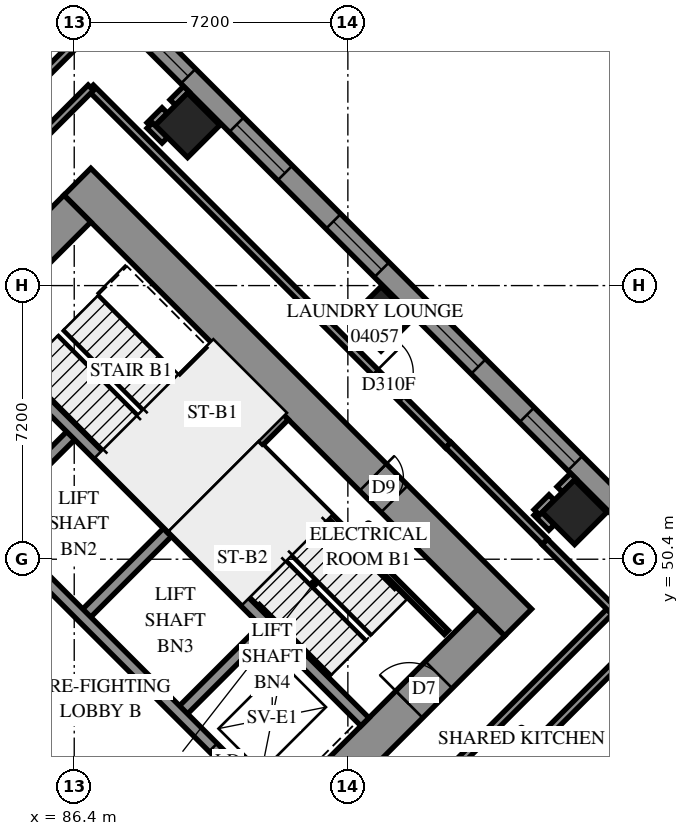
"""IFC4 building model, lengths in metres.
Left out: names, types, materials, properties, quantities, classifications, styles, units other than length and angle.
Written with IfcOpenShell. Run it as: python <this file> out.ifc"""

import sys

from ifc_helpers import new_model, si_unit, direction, frame, frame_2d, origin, origin_2d, place, context, subcontext, project, spatial, polyline, rectangle, outline, extrude, element, fill, save


model = new_model("IFC4")
c1 = context("Model", 3, precision=1e-05, world=origin(), true_north=direction((0.0, 1.0)))
c2 = subcontext(c1, "Body", "Model", "MODEL_VIEW")
j1 = project(units=[si_unit("LENGTHUNIT", "METRE"), si_unit("PLANEANGLEUNIT", "RADIAN")], contexts=[c1])
p1 = place(None, origin())
s1 = spatial("IfcSite", under=j1, at=p1, CompositionType="ELEMENT")
p2 = place(p1, origin())
s2 = spatial("IfcBuilding", under=s1, at=p2, CompositionType="ELEMENT")
p3 = place(p2, frame((0.0, 0.0, 18.6)))
s3 = spatial("IfcBuildingStorey", under=s2, at=p3, CompositionType="ELEMENT", Elevation=18.6)
for number, where, z_axis, x_axis in (
    (1, (89.382, 61.818, 0.0), (0.0, 0.0, 1.0), (0.707, -0.707, 0.0)),
    (2, (94.474, 56.727, 0.0), (0.0, 0.0, 1.0), (0.707, -0.707, 0.0)),
    (3, (99.565, 51.635, 0.0), (0.0, 0.0, 1.0), (0.707, -0.707, 0.0)),
):
    element("IfcColumn", number, at=place(p3, frame(where, z_axis=z_axis, x_axis=x_axis)), inside=s3, PredefinedType="COLUMN", context=c2, shape_type="SweptSolid", body=[
        extrude(rectangle(XDim=1.2, YDim=1.2, at=origin_2d()), origin(), (0.0, 0.0, 1.0), 3.8),
    ])
p4 = place(p3, frame((75.594, 49.443, -0.4), z_axis=(0.0, 0.0, 1.0), x_axis=(0.7071037324, -0.70710983, 0.0)))
e4 = element("IfcWall", 4, at=p4, inside=s3, PredefinedType="SHEAR", context=c2, shape_type="SweptSolid", body=[
    extrude(rectangle(XDim=16.4, YDim=1.0, at=frame_2d((8.2, 0.0))), origin(), (0.0, 0.0, 1.0), 3.5),
])
p5 = place(p3, frame((86.483, 60.333, -0.4), z_axis=(0.0, 0.0, 1.0), x_axis=(0.70710983, -0.7071037324, 0.0)))
e5 = element("IfcWall", 5, at=p5, inside=s3, PredefinedType="SHEAR", context=c2, shape_type="SweptSolid", body=[
    extrude(rectangle(XDim=16.4, YDim=1.0, at=frame_2d((8.2, 0.0))), origin(), (0.0, 0.0, 1.0), 3.5),
])
p6 = place(p5, frame((11.0, 0.0, 0.4)))
e6 = element("IfcOpeningElement", 6, at=p6, cuts=e5, PredefinedType="OPENING", context=c2, shape_type="SweptSolid", body=[
    extrude(rectangle(XDim=0.8, YDim=2.1, at=frame_2d((0.4, 1.05))), frame((0.0, 0.51, 0.0), z_axis=(0.0, -1.0, 0.0), x_axis=(1.0, 0.0, 0.0)), (0.0, 0.0, 1.0), 1.02),
])
p7 = place(p3, frame((76.301, 49.443, -0.4), z_axis=(0.0, 0.0, 1.0), x_axis=(0.7071067812, 0.7071067812, 0.0)))
e7 = element("IfcWall", 7, at=p7, inside=s3, PredefinedType="SHEAR", context=c2, shape_type="SweptSolid", body=[
    extrude(rectangle(XDim=14.4, YDim=1.0, at=frame_2d((7.2, 0.0))), origin(), (0.0, 0.0, 1.0), 3.5),
])
p8 = place(p7, frame((4.55, 0.0, 0.4)))
e8 = element("IfcOpeningElement", 8, at=p8, cuts=e7, PredefinedType="OPENING", context=c2, shape_type="SweptSolid", body=[
    extrude(rectangle(XDim=1.1, YDim=2.1, at=frame_2d((0.55, 1.05))), frame((0.0, 0.51, 0.0), z_axis=(0.0, -1.0, 0.0), x_axis=(1.0, 0.0, 0.0)), (0.0, 0.0, 1.0), 1.02),
])
p9 = place(p7, frame((11.35, 0.0, 0.4)))
e9 = element("IfcOpeningElement", 9, at=p9, cuts=e7, PredefinedType="OPENING", context=c2, shape_type="SweptSolid", body=[
    extrude(rectangle(XDim=1.1, YDim=2.1, at=frame_2d((0.55, 1.05))), frame((0.0, 0.51, 0.0), z_axis=(0.0, -1.0, 0.0), x_axis=(1.0, 0.0, 0.0)), (0.0, 0.0, 1.0), 1.02),
])
p10 = place(p3, frame((87.19, 38.554, -0.4), z_axis=(0.0, 0.0, 1.0), x_axis=(0.707103309, 0.7071102534, 0.0)))
e10 = element("IfcWall", 10, at=p10, inside=s3, PredefinedType="SHEAR", context=c2, shape_type="SweptSolid", body=[
    extrude(rectangle(XDim=14.4, YDim=1.0, at=frame_2d((7.2, 0.0))), origin(), (0.0, 0.0, 1.0), 3.5),
])
p11 = place(p10, frame((4.55, 0.0, 0.4)))
e11 = element("IfcOpeningElement", 11, at=p11, cuts=e10, PredefinedType="OPENING", context=c2, shape_type="SweptSolid", body=[
    extrude(rectangle(XDim=1.1, YDim=2.1, at=frame_2d((0.55, 1.05))), frame((0.0, 0.51, 0.0), z_axis=(0.0, -1.0, 0.0), x_axis=(1.0, 0.0, 0.0)), (0.0, 0.0, 1.0), 1.02),
])
p12 = place(p10, frame((11.35, 0.0, 0.4)))
e12 = element("IfcOpeningElement", 12, at=p12, cuts=e10, PredefinedType="OPENING", context=c2, shape_type="SweptSolid", body=[
    extrude(rectangle(XDim=1.1, YDim=2.1, at=frame_2d((0.55, 1.05))), frame((0.0, 0.51, 0.0), z_axis=(0.0, -1.0, 0.0), x_axis=(1.0, 0.0, 0.0)), (0.0, 0.0, 1.0), 1.02),
])
p13 = place(p3, frame((84.079, 51.423, 0.0), z_axis=(0.0, 0.0, 1.0), x_axis=(0.7071219326, 0.7070916295, 0.0)))
e13 = element("IfcWall", 13, at=p13, inside=s3, PredefinedType="SOLIDWALL", context=c2, shape_type="SweptSolid", body=[
    extrude(rectangle(XDim=3.3, YDim=0.3, at=frame_2d((1.65, 0.0))), origin(), (0.0, 0.0, 1.0), 3.8),
])
for number, where, z_axis, x_axis in (
    (14, (86.625, 48.878, 0.0), (0.0, 0.0, 1.0), (0.707, 0.707, 0.0)),
    (15, (89.17, 46.332, 0.0), (0.0, 0.0, 1.0), (0.707, 0.707, 0.0)),
):
    element("IfcWall", number, at=place(p3, frame(where, z_axis=z_axis, x_axis=x_axis)), inside=s3, PredefinedType="SOLIDWALL", context=c2, shape_type="SweptSolid", body=[
        extrude(rectangle(XDim=3.3, YDim=0.3, at=frame_2d((1.65, 0.0))), origin(), (0.0, 0.0, 1.0), 3.8),
    ])
p14 = place(p3, frame((78.988, 51.423, 0.0), z_axis=(0.0, 0.0, 1.0), x_axis=(0.7071067812, -0.7071067812, 0.0)))
e16 = element("IfcWall", 16, at=p14, inside=s3, PredefinedType="SOLIDWALL", context=c2, shape_type="SweptSolid", body=[
    extrude(rectangle(XDim=14.4, YDim=0.3, at=frame_2d((7.2, 0.0))), origin(), (0.0, 0.0, 1.0), 3.8),
])
p15 = place(p14, frame((1.25, 0.0, 0.0)))
e17 = element("IfcOpeningElement", 17, at=p15, cuts=e16, PredefinedType="OPENING", context=c2, shape_type="SweptSolid", body=[
    extrude(rectangle(XDim=1.1, YDim=2.1, at=frame_2d((0.55, 1.05))), frame((0.0, 0.16, 0.0), z_axis=(0.0, -1.0, 0.0), x_axis=(1.0, 0.0, 0.0)), (0.0, 0.0, 1.0), 0.32),
])
p16 = place(p14, frame((4.85, 0.0, 0.0)))
e18 = element("IfcOpeningElement", 18, at=p16, cuts=e16, PredefinedType="OPENING", context=c2, shape_type="SweptSolid", body=[
    extrude(rectangle(XDim=1.1, YDim=2.1, at=frame_2d((0.55, 1.05))), frame((0.0, 0.16, 0.0), z_axis=(0.0, -1.0, 0.0), x_axis=(1.0, 0.0, 0.0)), (0.0, 0.0, 1.0), 0.32),
])
p17 = place(p14, frame((8.45, 0.0, 0.0)))
e19 = element("IfcOpeningElement", 19, at=p17, cuts=e16, PredefinedType="OPENING", context=c2, shape_type="SweptSolid", body=[
    extrude(rectangle(XDim=1.1, YDim=2.1, at=frame_2d((0.55, 1.05))), frame((0.0, 0.16, 0.0), z_axis=(0.0, -1.0, 0.0), x_axis=(1.0, 0.0, 0.0)), (0.0, 0.0, 1.0), 0.32),
])
p18 = place(p14, frame((12.05, 0.0, 0.0)))
e20 = element("IfcOpeningElement", 20, at=p18, cuts=e16, PredefinedType="OPENING", context=c2, shape_type="SweptSolid", body=[
    extrude(rectangle(XDim=1.1, YDim=2.1, at=frame_2d((0.55, 1.05))), frame((0.0, 0.16, 0.0), z_axis=(0.0, -1.0, 0.0), x_axis=(1.0, 0.0, 0.0)), (0.0, 0.0, 1.0), 0.32),
])
p19 = place(p3, frame((81.534, 53.969, 0.0), z_axis=(0.0, 0.0, 1.0), x_axis=(0.707103309, -0.7071102534, 0.0)))
e21 = element("IfcWall", 21, at=p19, inside=s3, PredefinedType="SOLIDWALL", context=c2, shape_type="SweptSolid", body=[
    extrude(rectangle(XDim=14.4, YDim=0.3, at=frame_2d((7.2, 0.0))), origin(), (0.0, 0.0, 1.0), 3.8),
])
p20 = place(p19, frame((12.05, 0.0, 0.0)))
e22 = element("IfcOpeningElement", 22, at=p20, cuts=e21, PredefinedType="OPENING", context=c2, shape_type="SweptSolid", body=[
    extrude(rectangle(XDim=1.1, YDim=2.1, at=frame_2d((0.55, 1.05))), frame((0.0, 0.16, 0.0), z_axis=(0.0, -1.0, 0.0), x_axis=(1.0, 0.0, 0.0)), (0.0, 0.0, 1.0), 0.32),
])
for number, where, z_axis, x_axis in (
    (23, (83.867, 56.302, 0.0), (0.0, 0.0, 1.0), (0.707, -0.707, 0.0)),
    (24, (88.958, 51.211, 0.0), (0.0, 0.0, 1.0), (0.707, -0.707, 0.0)),
):
    element("IfcWall", number, at=place(p3, frame(where, z_axis=z_axis, x_axis=x_axis)), inside=s3, PredefinedType="SOLIDWALL", context=c2, shape_type="SweptSolid", body=[
        extrude(rectangle(XDim=7.2, YDim=0.3, at=frame_2d((3.6, 0.0))), origin(), (0.0, 0.0, 1.0), 3.8),
    ])
p21 = place(p3, frame((88.958, 51.211, 0.0), z_axis=(0.0, 0.0, 1.0), x_axis=(0.7071067812, 0.7071067812, 0.0)))
e25 = element("IfcWall", 25, at=p21, inside=s3, PredefinedType="SOLIDWALL", context=c2, shape_type="SweptSolid", body=[
    extrude(rectangle(XDim=4.2, YDim=0.3, at=frame_2d((2.1, 0.0))), origin(), (0.0, 0.0, 1.0), 3.8),
])
p22 = place(p3, frame((117.843, 34.665, 0.0), z_axis=(0.0, 0.0, 1.0), x_axis=(-0.7071067812, 0.7071067812, 0.0)))
e26 = element("IfcWall", 26, at=p22, inside=s3, PredefinedType="SOLIDWALL", context=c2, shape_type="SweptSolid", body=[
    extrude(outline(polyline([(-0.275, -0.275), (54.222, -0.275), (53.994, 0.275), (0.275, 0.275), (-0.275, -0.275)])), origin(), (0.0, 0.0, 1.0), 3.8),
])
p23 = place(p22, frame((0.8, 0.0, 0.7)))
e27 = element("IfcOpeningElement", 27, at=p23, cuts=e26, PredefinedType="OPENING", context=c2, shape_type="SweptSolid", body=[
    extrude(rectangle(XDim=1.8, YDim=2.4, at=frame_2d((0.9, 1.2))), frame((0.0, 0.285, 0.0), z_axis=(0.0, -1.0, 0.0), x_axis=(1.0, 0.0, 0.0)), (0.0, 0.0, 1.0), 0.57),
])
p24 = place(p22, frame((4.225, 0.0, 0.7)))
e28 = element("IfcOpeningElement", 28, at=p24, cuts=e26, PredefinedType="OPENING", context=c2, shape_type="SweptSolid", body=[
    extrude(rectangle(XDim=1.8, YDim=2.4, at=frame_2d((0.9, 1.2))), frame((0.0, 0.285, 0.0), z_axis=(0.0, -1.0, 0.0), x_axis=(1.0, 0.0, 0.0)), (0.0, 0.0, 1.0), 0.57),
])
p25 = place(p22, frame((7.825, 0.0, 0.7)))
e29 = element("IfcOpeningElement", 29, at=p25, cuts=e26, PredefinedType="OPENING", context=c2, shape_type="SweptSolid", body=[
    extrude(rectangle(XDim=1.8, YDim=2.4, at=frame_2d((0.9, 1.2))), frame((0.0, 0.285, 0.0), z_axis=(0.0, -1.0, 0.0), x_axis=(1.0, 0.0, 0.0)), (0.0, 0.0, 1.0), 0.57),
])
p26 = place(p22, frame((11.425, 0.0, 0.7)))
e30 = element("IfcOpeningElement", 30, at=p26, cuts=e26, PredefinedType="OPENING", context=c2, shape_type="SweptSolid", body=[
    extrude(rectangle(XDim=1.8, YDim=2.4, at=frame_2d((0.9, 1.2))), frame((0.0, 0.285, 0.0), z_axis=(0.0, -1.0, 0.0), x_axis=(1.0, 0.0, 0.0)), (0.0, 0.0, 1.0), 0.57),
])
p27 = place(p22, frame((15.025, 0.0, 0.7)))
e31 = element("IfcOpeningElement", 31, at=p27, cuts=e26, PredefinedType="OPENING", context=c2, shape_type="SweptSolid", body=[
    extrude(rectangle(XDim=1.8, YDim=2.4, at=frame_2d((0.9, 1.2))), frame((0.0, 0.285, 0.0), z_axis=(0.0, -1.0, 0.0), x_axis=(1.0, 0.0, 0.0)), (0.0, 0.0, 1.0), 0.57),
])
p28 = place(p22, frame((18.625, 0.0, 0.7)))
e32 = element("IfcOpeningElement", 32, at=p28, cuts=e26, PredefinedType="OPENING", context=c2, shape_type="SweptSolid", body=[
    extrude(rectangle(XDim=1.8, YDim=2.4, at=frame_2d((0.9, 1.2))), frame((0.0, 0.285, 0.0), z_axis=(0.0, -1.0, 0.0), x_axis=(1.0, 0.0, 0.0)), (0.0, 0.0, 1.0), 0.57),
])
p29 = place(p22, frame((22.225, 0.0, 0.7)))
e33 = element("IfcOpeningElement", 33, at=p29, cuts=e26, PredefinedType="OPENING", context=c2, shape_type="SweptSolid", body=[
    extrude(rectangle(XDim=1.8, YDim=2.4, at=frame_2d((0.9, 1.2))), frame((0.0, 0.285, 0.0), z_axis=(0.0, -1.0, 0.0), x_axis=(1.0, 0.0, 0.0)), (0.0, 0.0, 1.0), 0.57),
])
p30 = place(p22, frame((25.825, 0.0, 0.7)))
e34 = element("IfcOpeningElement", 34, at=p30, cuts=e26, PredefinedType="OPENING", context=c2, shape_type="SweptSolid", body=[
    extrude(rectangle(XDim=1.8, YDim=2.4, at=frame_2d((0.9, 1.2))), frame((0.0, 0.285, 0.0), z_axis=(0.0, -1.0, 0.0), x_axis=(1.0, 0.0, 0.0)), (0.0, 0.0, 1.0), 0.57),
])
p31 = place(p22, frame((29.425, 0.0, 0.7)))
e35 = element("IfcOpeningElement", 35, at=p31, cuts=e26, PredefinedType="OPENING", context=c2, shape_type="SweptSolid", body=[
    extrude(rectangle(XDim=1.8, YDim=2.4, at=frame_2d((0.9, 1.2))), frame((0.0, 0.285, 0.0), z_axis=(0.0, -1.0, 0.0), x_axis=(1.0, 0.0, 0.0)), (0.0, 0.0, 1.0), 0.57),
])
p32 = place(p22, frame((33.025, 0.0, 0.7)))
e36 = element("IfcOpeningElement", 36, at=p32, cuts=e26, PredefinedType="OPENING", context=c2, shape_type="SweptSolid", body=[
    extrude(rectangle(XDim=1.8, YDim=2.4, at=frame_2d((0.9, 1.2))), frame((0.0, 0.285, 0.0), z_axis=(0.0, -1.0, 0.0), x_axis=(1.0, 0.0, 0.0)), (0.0, 0.0, 1.0), 0.57),
])
p33 = place(p22, frame((36.625, 0.0, 0.7)))
e37 = element("IfcOpeningElement", 37, at=p33, cuts=e26, PredefinedType="OPENING", context=c2, shape_type="SweptSolid", body=[
    extrude(rectangle(XDim=1.8, YDim=2.4, at=frame_2d((0.9, 1.2))), frame((0.0, 0.285, 0.0), z_axis=(0.0, -1.0, 0.0), x_axis=(1.0, 0.0, 0.0)), (0.0, 0.0, 1.0), 0.57),
])
p34 = place(p22, frame((40.225, 0.0, 0.7)))
e38 = element("IfcOpeningElement", 38, at=p34, cuts=e26, PredefinedType="OPENING", context=c2, shape_type="SweptSolid", body=[
    extrude(rectangle(XDim=1.8, YDim=2.4, at=frame_2d((0.9, 1.2))), frame((0.0, 0.285, 0.0), z_axis=(0.0, -1.0, 0.0), x_axis=(1.0, 0.0, 0.0)), (0.0, 0.0, 1.0), 0.57),
])
p35 = place(p22, frame((43.825, 0.0, 0.7)))
e39 = element("IfcOpeningElement", 39, at=p35, cuts=e26, PredefinedType="OPENING", context=c2, shape_type="SweptSolid", body=[
    extrude(rectangle(XDim=1.8, YDim=2.4, at=frame_2d((0.9, 1.2))), frame((0.0, 0.285, 0.0), z_axis=(0.0, -1.0, 0.0), x_axis=(1.0, 0.0, 0.0)), (0.0, 0.0, 1.0), 0.57),
])
p36 = place(p22, frame((47.425, 0.0, 0.7)))
e40 = element("IfcOpeningElement", 40, at=p36, cuts=e26, PredefinedType="OPENING", context=c2, shape_type="SweptSolid", body=[
    extrude(rectangle(XDim=1.8, YDim=2.4, at=frame_2d((0.9, 1.2))), frame((0.0, 0.285, 0.0), z_axis=(0.0, -1.0, 0.0), x_axis=(1.0, 0.0, 0.0)), (0.0, 0.0, 1.0), 0.57),
])
p37 = place(p22, frame((51.06, 0.0, 0.7)))
e41 = element("IfcOpeningElement", 41, at=p37, cuts=e26, PredefinedType="OPENING", context=c2, shape_type="SweptSolid", body=[
    extrude(rectangle(XDim=1.8, YDim=2.4, at=frame_2d((0.9, 1.2))), frame((0.0, 0.285, 0.0), z_axis=(0.0, -1.0, 0.0), x_axis=(1.0, 0.0, 0.0)), (0.0, 0.0, 1.0), 0.57),
])
p38 = place(p3, frame((91.313, 53.354, 0.0), z_axis=(0.0, 0.0, 1.0), x_axis=(0.7071140275, -0.7070995348, 0.0)))
e42 = element("IfcWall", 42, at=p38, inside=s3, PredefinedType="PARTITIONING", context=c2, shape_type="SweptSolid", body=[
    extrude(rectangle(XDim=6.9, YDim=0.15, at=frame_2d((3.45, 0.0))), origin(), (0.0, 0.0, 1.0), 3.8),
])
p39 = place(p3, frame((86.833, 62.805, 0.0), z_axis=(0.0, 0.0, 1.0), x_axis=(0.7072045138, -0.7070090351, 0.0)))
e43 = element("IfcWall", 43, at=p39, inside=s3, PredefinedType="PARTITIONING", context=c2, shape_type="SweptSolid", body=[
    extrude(rectangle(XDim=13.301, YDim=0.2, at=frame_2d((6.65, 0.0))), origin(), (0.0, 0.0, 1.0), 3.8),
])
p40 = place(p39, frame((10.586, 0.0, 0.0)))
e44 = element("IfcOpeningElement", 44, at=p40, cuts=e43, PredefinedType="OPENING", context=c2, shape_type="SweptSolid", body=[
    extrude(rectangle(XDim=1.0, YDim=2.1, at=frame_2d((0.5, 1.05))), frame((0.0, 0.11, 0.0), z_axis=(0.0, -1.0, 0.0), x_axis=(1.0, 0.0, 0.0)), (0.0, 0.0, 1.0), 0.22),
])
p41 = place(p3, frame((95.003, 41.985, 0.0), z_axis=(0.0, 0.0, 1.0), x_axis=(0.7071114543, 0.707102108, 0.0)))
e45 = element("IfcWall", 45, at=p41, inside=s3, PredefinedType="PARTITIONING", context=c2, shape_type="SweptSolid", body=[
    extrude(rectangle(XDim=10.699, YDim=0.2, at=frame_2d((5.35, 0.0))), origin(), (0.0, 0.0, 1.0), 3.8),
])
p42 = place(p3, frame((94.226, 42.762, 0.0), z_axis=(0.0, 0.0, 1.0), x_axis=(0.7071067812, 0.7071067812, 0.0)))
e46 = element("IfcWall", 46, at=p42, inside=s3, PredefinedType="PARTITIONING", context=c2, shape_type="SweptSolid", body=[
    extrude(rectangle(XDim=8.949, YDim=0.2, at=frame_2d((4.474, 0.0))), origin(), (0.0, 0.0, 1.0), 3.8),
])
p43 = place(p42, frame((0.149, 0.0, 0.0)))
e47 = element("IfcOpeningElement", 47, at=p43, cuts=e46, PredefinedType="OPENING", context=c2, shape_type="SweptSolid", body=[
    extrude(rectangle(XDim=1.0, YDim=2.1, at=frame_2d((0.5, 1.05))), frame((0.0, 0.11, 0.0), z_axis=(0.0, -1.0, 0.0), x_axis=(1.0, 0.0, 0.0)), (0.0, 0.0, 1.0), 0.22),
])
p44 = place(p3, frame((81.049, 58.577, 0.0), z_axis=(0.0, 0.0, 1.0), x_axis=(0.7071124411, 0.7071011213, 0.0)))
e48 = element("IfcWall", 48, at=p44, inside=s3, PredefinedType="PARTITIONING", context=c2, shape_type="SweptSolid", body=[
    extrude(rectangle(XDim=8.834, YDim=0.2, at=frame_2d((4.417, 0.0))), origin(), (0.0, 0.0, 1.0), 3.8),
])
p45 = place(p3, frame((81.053, 57.021, 0.0), z_axis=(0.0, 0.0, 1.0), x_axis=(0.7069845395, 0.7072290017, 0.0)))
e49 = element("IfcWall", 49, at=p45, inside=s3, PredefinedType="PARTITIONING", context=c2, shape_type="SweptSolid", body=[
    extrude(rectangle(XDim=8.181, YDim=0.2, at=frame_2d((4.091, 0.0))), origin(), (0.0, 0.0, 1.0), 3.8),
])
p46 = place(p45, frame((0.863, 0.0, 0.0)))
e50 = element("IfcOpeningElement", 50, at=p46, cuts=e49, PredefinedType="OPENING", context=c2, shape_type="SweptSolid", body=[
    extrude(rectangle(XDim=1.0, YDim=2.1, at=frame_2d((0.5, 1.05))), frame((0.0, 0.11, 0.0), z_axis=(0.0, -1.0, 0.0), x_axis=(1.0, 0.0, 0.0)), (0.0, 0.0, 1.0), 0.22),
])
p47 = place(p3, frame((96.244, 53.406, 0.0), z_axis=(0.0, 0.0, 1.0), x_axis=(0.7068288851, -0.7073845681, 0.0)))
e51 = element("IfcWall", 51, at=p47, inside=s3, PredefinedType="PARTITIONING", context=c2, shape_type="SweptSolid", body=[
    extrude(rectangle(XDim=3.599, YDim=0.2, at=frame_2d((1.8, 0.0))), origin(), (0.0, 0.0, 1.0), 3.8),
])
p48 = place(p3, frame((98.783, 50.855, 0.0), z_axis=(0.0, 0.0, 1.0), x_axis=(0.7071067812, -0.7071067812, 0.0)))
e52 = element("IfcWall", 52, at=p48, inside=s3, PredefinedType="PARTITIONING", context=c2, shape_type="SweptSolid", body=[
    extrude(rectangle(XDim=2.5, YDim=0.2, at=frame_2d((1.25, 0.0))), origin(), (0.0, 0.0, 1.0), 3.8),
])
p49 = place(p3, frame((88.388, 61.815, 0.0), z_axis=(0.0, 0.0, 1.0), x_axis=(0.7071067812, 0.7071067812, 0.0)))
e53 = element("IfcWall", 53, at=p49, inside=s3, PredefinedType="PARTITIONING", context=c2, shape_type="SweptSolid", body=[
    extrude(rectangle(XDim=0.557, YDim=0.2, at=frame_2d((0.279, 0.0))), origin(), (0.0, 0.0, 1.0), 3.8),
])
for number, where, z_axis, x_axis in (
    (54, (88.388, 61.813, 0.0), (0.0, 0.0, 1.0), (0.709, -0.705, 0.0)),
    (55, (98.569, 51.629, 0.0), (0.0, 0.0, 1.0), (0.705, -0.709, 0.0)),
):
    element("IfcWall", number, at=place(p3, frame(where, z_axis=z_axis, x_axis=x_axis)), inside=s3, PredefinedType="PARTITIONING", context=c2, shape_type="SweptSolid", body=[
        extrude(rectangle(XDim=0.556, YDim=0.2, at=frame_2d((0.278, 0.0))), origin(), (0.0, 0.0, 1.0), 3.8),
    ])
p50 = place(p3, frame((98.571, 51.633, 0.0), z_axis=(0.0, 0.0, 1.0), x_axis=(0.7071067812, 0.7071067812, 0.0)))
e56 = element("IfcWall", 56, at=p50, inside=s3, PredefinedType="PARTITIONING", context=c2, shape_type="SweptSolid", body=[
    extrude(rectangle(XDim=0.554, YDim=0.2, at=frame_2d((0.277, 0.0))), origin(), (0.0, 0.0, 1.0), 3.8),
])
p51 = place(p3, frame((88.992, 62.419, 0.0), z_axis=(0.0, 0.0, 1.0), x_axis=(0.7072064649, 0.7070070834, 0.0)))
e57 = element("IfcWall", 57, at=p51, inside=s3, PredefinedType="PARTITIONING", context=c2, shape_type="SweptSolid", body=[
    extrude(rectangle(XDim=0.502, YDim=0.2, at=frame_2d((0.251, 0.0))), origin(), (0.0, 0.0, 1.0), 3.8),
])
p52 = place(p3, frame((99.175, 52.237, 0.0), z_axis=(0.0, 0.0, 1.0), x_axis=(0.7070068014, 0.7072067468, 0.0)))
e58 = element("IfcWall", 58, at=p52, inside=s3, PredefinedType="PARTITIONING", context=c2, shape_type="SweptSolid", body=[
    extrude(rectangle(XDim=0.5, YDim=0.2, at=frame_2d((0.25, 0.0))), origin(), (0.0, 0.0, 1.0), 3.8),
])
p53 = place(p30, origin())
e59 = element("IfcWindow", 59, at=p53, inside=s3, PartitioningType="SINGLE_PANEL", PredefinedType="WINDOW", context=c2, shape_type="SweptSolid", body=[
    extrude(rectangle(XDim=1.8, YDim=2.4, at=frame_2d((0.9, 1.2))), frame((0.0, 0.155, 0.0), z_axis=(0.0, -1.0, 0.0), x_axis=(1.0, 0.0, 0.0)), (0.0, 0.0, 1.0), 0.06),
])
fill(e34, e59)
p54 = place(p31, origin())
e60 = element("IfcWindow", 60, at=p54, inside=s3, PartitioningType="SINGLE_PANEL", PredefinedType="WINDOW", context=c2, shape_type="SweptSolid", body=[
    extrude(rectangle(XDim=1.8, YDim=2.4, at=frame_2d((0.9, 1.2))), frame((0.0, 0.155, 0.0), z_axis=(0.0, -1.0, 0.0), x_axis=(1.0, 0.0, 0.0)), (0.0, 0.0, 1.0), 0.06),
])
fill(e35, e60)
p55 = place(p32, origin())
e61 = element("IfcWindow", 61, at=p55, inside=s3, PartitioningType="SINGLE_PANEL", PredefinedType="WINDOW", context=c2, shape_type="SweptSolid", body=[
    extrude(rectangle(XDim=1.8, YDim=2.4, at=frame_2d((0.9, 1.2))), frame((0.0, 0.155, 0.0), z_axis=(0.0, -1.0, 0.0), x_axis=(1.0, 0.0, 0.0)), (0.0, 0.0, 1.0), 0.06),
])
fill(e36, e61)
p56 = place(p33, origin())
e62 = element("IfcWindow", 62, at=p56, inside=s3, PartitioningType="SINGLE_PANEL", PredefinedType="WINDOW", context=c2, shape_type="SweptSolid", body=[
    extrude(rectangle(XDim=1.8, YDim=2.4, at=frame_2d((0.9, 1.2))), frame((0.0, 0.155, 0.0), z_axis=(0.0, -1.0, 0.0), x_axis=(1.0, 0.0, 0.0)), (0.0, 0.0, 1.0), 0.06),
])
fill(e37, e62)
p57 = place(p34, origin())
e63 = element("IfcWindow", 63, at=p57, inside=s3, PartitioningType="SINGLE_PANEL", PredefinedType="WINDOW", context=c2, shape_type="SweptSolid", body=[
    extrude(rectangle(XDim=1.8, YDim=2.4, at=frame_2d((0.9, 1.2))), frame((0.0, 0.155, 0.0), z_axis=(0.0, -1.0, 0.0), x_axis=(1.0, 0.0, 0.0)), (0.0, 0.0, 1.0), 0.06),
])
fill(e38, e63)
p58 = place(p6, origin())
e64 = element("IfcDoor", 64, at=p58, inside=s3, OperationType="SINGLE_SWING_RIGHT", PredefinedType="DOOR", context=c2, shape_type="SweptSolid", body=[
    extrude(rectangle(XDim=0.8, YDim=2.1, at=frame_2d((0.4, 1.05))), frame((0.0, -0.44, 0.0), z_axis=(0.0, -1.0, 0.0), x_axis=(1.0, 0.0, 0.0)), (0.0, 0.0, 1.0), 0.05),
])
fill(e6, e64)
p59 = place(p12, origin())
e65 = element("IfcDoor", 65, at=p59, inside=s3, OperationType="SINGLE_SWING_RIGHT", PredefinedType="DOOR", context=c2, shape_type="SweptSolid", body=[
    extrude(rectangle(XDim=1.1, YDim=2.1, at=frame_2d((0.55, 1.05))), frame((0.0, 0.025, 0.0), z_axis=(0.0, -1.0, 0.0), x_axis=(1.0, 0.0, 0.0)), (0.0, 0.0, 1.0), 0.05),
])
fill(e12, e65)
p60 = place(p20, origin())
e66 = element("IfcDoor", 66, at=p60, inside=s3, OperationType="SLIDING_TO_RIGHT", PredefinedType="DOOR", context=c2, shape_type="SweptSolid", body=[
    extrude(rectangle(XDim=1.1, YDim=2.1, at=frame_2d((0.55, 1.05))), frame((0.0, 0.025, 0.0), z_axis=(0.0, -1.0, 0.0), x_axis=(1.0, 0.0, 0.0)), (0.0, 0.0, 1.0), 0.05),
])
fill(e22, e66)
p61 = place(p40, origin())
e67 = element("IfcDoor", 67, at=p61, inside=s3, OperationType="SINGLE_SWING_LEFT", PredefinedType="DOOR", context=c2, shape_type="SweptSolid", body=[
    extrude(rectangle(XDim=1.0, YDim=2.1, at=frame_2d((0.5, 1.05))), frame((0.0, 0.025, 0.0), z_axis=(0.0, -1.0, 0.0), x_axis=(1.0, 0.0, 0.0)), (0.0, 0.0, 1.0), 0.05),
])
fill(e44, e67)
save(model, sys.argv[1])
